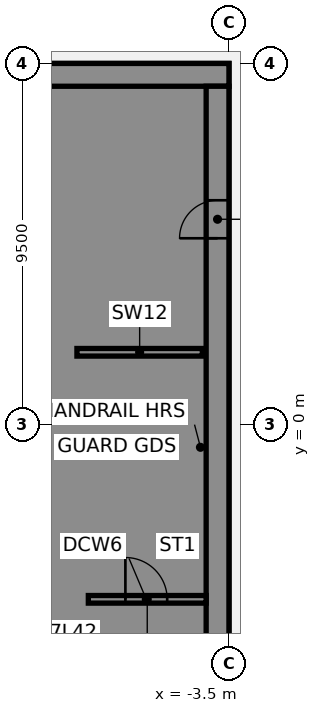
"""IFC4 building model, lengths in metres.
Left out: names, types, materials, properties, quantities, classifications, styles, units other than length and angle.
Written with IfcOpenShell. Run it as: python <this file> out.ifc"""

import sys

from ifc_helpers import new_model, si_unit, direction, frame, frame_2d, origin, place, context, subcontext, project, spatial, polyline, rectangle, outline, extrude, element, fill, save


model = new_model("IFC4")
c1 = context("Model", 3, precision=1e-05, world=origin(), true_north=direction((0.0, 1.0)))
c2 = subcontext(c1, "Body", "Model", "MODEL_VIEW")
j1 = project(units=[si_unit("LENGTHUNIT", "METRE"), si_unit("PLANEANGLEUNIT", "RADIAN")], contexts=[c1])
p1 = place(None, origin())
s1 = spatial("IfcSite", under=j1, at=p1, CompositionType="ELEMENT")
p2 = place(p1, origin())
s2 = spatial("IfcBuilding", under=s1, at=p2, CompositionType="ELEMENT")
p3 = place(p2, frame((0.0, 0.0, 170.5)))
s3 = spatial("IfcBuildingStorey", under=s2, at=p3, CompositionType="ELEMENT", Elevation=170.5)
p4 = place(p3, frame((-16.5, 9.2, 0.0), z_axis=(0.0, 0.0, 1.0), x_axis=(1.0, 0.0, 0.0)))
e1 = element("IfcWall", 1, at=p4, inside=s3, PredefinedType="SHEAR", context=c2, shape_type="SweptSolid", body=[
    extrude(rectangle(XDim=13.0, YDim=0.6, at=frame_2d((6.5, 0.0))), origin(), (0.0, 0.0, 1.0), 3.61),
])
p5 = place(p3, origin())
e2 = element("IfcWall", 2, at=p5, inside=s3, PredefinedType="SHEAR", context=c2, shape_type="SweptSolid", body=[
    extrude(outline(polyline([(-9.8, -5.375), (-9.8, -5.625), (-7.5, -5.625), (-7.2, -5.625), (-7.2, 8.9), (-7.5, 8.9), (-9.8, 8.9), (-9.8, 8.125), (-7.5, 8.125), (-7.5, 5.625), (-9.8, 5.625), (-9.8, 5.375), (-7.5, 5.375), (-7.5, 2.875), (-9.8, 2.875), (-9.8, 2.625), (-7.5, 2.625), (-7.5, 0.125), (-9.8, 0.125), (-9.8, -0.125), (-7.5, -0.125), (-7.5, -2.625), (-9.8, -2.625), (-9.8, -2.875), (-7.5, -2.875), (-7.5, -5.375), (-9.8, -5.375)])), origin(), (0.0, 0.0, 1.0), 3.61),
])
p6 = place(p3, frame((-7.5, 1.9, 0.0), z_axis=(0.0, 0.0, 1.0), x_axis=(1.0, 0.0, 0.0)))
e3 = element("IfcWall", 3, at=p6, inside=s3, PredefinedType="SHEAR", context=c2, shape_type="SweptSolid", body=[
    extrude(rectangle(XDim=3.3, YDim=0.2, at=frame_2d((1.65, 0.0))), origin(), (0.0, 0.0, 1.0), 3.61),
])
p7 = place(p3, frame((-3.8, -8.9, 0.0), z_axis=(0.0, 0.0, 1.0), x_axis=(0.0, 1.0, 0.0)))
e4 = element("IfcWall", 4, at=p7, inside=s3, PredefinedType="SHEAR", context=c2, shape_type="SweptSolid", body=[
    extrude(rectangle(XDim=17.8, YDim=0.6, at=frame_2d((8.9, 0.0))), origin(), (0.0, 0.0, 1.0), 3.61),
])
p8 = place(p7, frame((1.25, 0.0, 0.0)))
e5 = element("IfcOpeningElement", 5, at=p8, cuts=e4, PredefinedType="OPENING", context=c2, shape_type="SweptSolid", body=[
    extrude(rectangle(XDim=1.8, YDim=2.1, at=frame_2d((0.9, 1.05))), frame((0.0, 0.31, 0.0), z_axis=(0.0, -1.0, 0.0), x_axis=(1.0, 0.0, 0.0)), (0.0, 0.0, 1.0), 0.62),
])
p9 = place(p7, frame((13.8, 0.0, 0.0)))
e6 = element("IfcOpeningElement", 6, at=p9, cuts=e4, PredefinedType="OPENING", context=c2, shape_type="SweptSolid", body=[
    extrude(rectangle(XDim=1.0, YDim=2.1, at=frame_2d((0.5, 1.05))), frame((0.0, 0.31, 0.0), z_axis=(0.0, -1.0, 0.0), x_axis=(1.0, 0.0, 0.0)), (0.0, 0.0, 1.0), 0.62),
])
p10 = place(p3, frame((-7.2, -4.6, 0.0), z_axis=(0.0, 0.0, 1.0), x_axis=(1.0, 0.0, 0.0)))
e7 = element("IfcWall", 7, at=p10, inside=s3, PredefinedType="SHEAR", context=c2, shape_type="SweptSolid", body=[
    extrude(rectangle(XDim=3.1, YDim=0.2, at=frame_2d((1.55, 0.0))), origin(), (0.0, 0.0, 1.0), 3.61),
])
p11 = place(p10, frame((0.975, 0.0, 0.0)))
e8 = element("IfcOpeningElement", 8, at=p11, cuts=e7, PredefinedType="OPENING", context=c2, shape_type="SweptSolid", body=[
    extrude(rectangle(XDim=1.1, YDim=2.1, at=frame_2d((0.55, 1.05))), frame((0.0, 0.11, 0.0), z_axis=(0.0, -1.0, 0.0), x_axis=(1.0, 0.0, 0.0)), (0.0, 0.0, 1.0), 0.22),
])
p12 = place(p9, origin())
e9 = element("IfcDoor", 9, at=p12, inside=s3, OperationType="SINGLE_SWING_LEFT", PredefinedType="DOOR", context=c2, shape_type="SweptSolid", body=[
    extrude(rectangle(XDim=1.0, YDim=2.1, at=frame_2d((0.5, 1.05))), frame((0.0, 0.025, 0.0), z_axis=(0.0, -1.0, 0.0), x_axis=(1.0, 0.0, 0.0)), (0.0, 0.0, 1.0), 0.05),
])
fill(e6, e9)
p13 = place(p11, origin())
e10 = element("IfcDoor", 10, at=p13, inside=s3, OperationType="SINGLE_SWING_LEFT", PredefinedType="DOOR", context=c2, shape_type="SweptSolid", body=[
    extrude(rectangle(XDim=1.1, YDim=2.1, at=frame_2d((0.55, 1.05))), frame((0.0, 0.025, 0.0), z_axis=(0.0, -1.0, 0.0), x_axis=(1.0, 0.0, 0.0)), (0.0, 0.0, 1.0), 0.05),
])
fill(e8, e10)
save(model, sys.argv[1])
